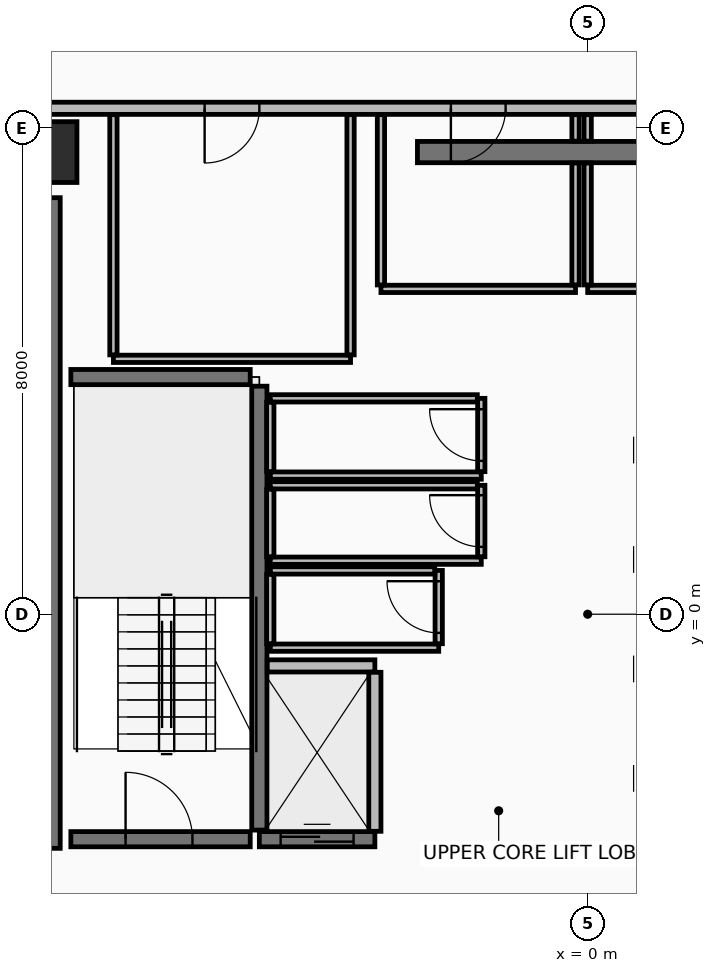
"""IFC4 building model, lengths in metres.
Left out: names, types, materials, properties, quantities, classifications, styles, units other than length and angle.
Written with IfcOpenShell. Run it as: python <this file> out.ifc"""

import sys

from ifc_helpers import new_model, si_unit, direction, frame, frame_2d, origin, origin_2d, place, context, subcontext, project, spatial, rectangle, extrude, element, fill, save


model = new_model("IFC4")
c1 = context("Model", 3, precision=1e-05, world=origin(), true_north=direction((0.0, 1.0)))
c2 = subcontext(c1, "Body", "Model", "MODEL_VIEW")
j1 = project(units=[si_unit("LENGTHUNIT", "METRE"), si_unit("PLANEANGLEUNIT", "RADIAN")], contexts=[c1])
p1 = place(None, origin())
s1 = spatial("IfcSite", under=j1, at=p1, CompositionType="ELEMENT")
p2 = place(p1, origin())
s2 = spatial("IfcBuilding", under=s1, at=p2, CompositionType="ELEMENT")
p3 = place(p2, frame((0.0, 0.0, 287.05)))
s3 = spatial("IfcBuildingStorey", under=s2, at=p3, CompositionType="ELEMENT", Elevation=287.05)
p4 = place(p3, frame((-8.9, 7.6, 0.0), z_axis=(0.0, 0.0, 1.0), x_axis=(1.0, 0.0, 0.0)))
e1 = element("IfcColumn", 1, at=p4, inside=s3, PredefinedType="COLUMN", context=c2, shape_type="SweptSolid", body=[
    extrude(rectangle(XDim=1.0, YDim=1.0, at=origin_2d()), origin(), (0.0, 0.0, 1.0), 3.65),
])
p5 = place(p3, frame((-2.8, 7.6, 0.0), z_axis=(0.0, 0.0, 1.0), x_axis=(1.0, 0.0, 0.0)))
e2 = element("IfcWall", 2, at=p5, inside=s3, PredefinedType="SHEAR", context=c2, shape_type="SweptSolid", body=[
    extrude(rectangle(XDim=5.38, YDim=0.35, at=frame_2d((2.69, 0.0))), origin(), (0.0, 0.0, 1.0), 3.465),
])
p6 = place(p3, frame((-8.9, -3.85, 0.0), z_axis=(0.0, 0.0, 1.0), x_axis=(0.0, 1.0, 0.0)))
e3 = element("IfcWall", 3, at=p6, inside=s3, PredefinedType="SHEAR", context=c2, shape_type="SweptSolid", body=[
    extrude(rectangle(XDim=10.7, YDim=0.45, at=frame_2d((5.35, 0.0))), origin(), (0.0, 0.0, 1.0), 3.465),
])
p7 = place(p3, frame((9.62, 8.32, 0.0), z_axis=(0.0, 0.0, 1.0), x_axis=(-1.0, 0.0, 0.0)))
e4 = element("IfcWall", 4, at=p7, inside=s3, PredefinedType="PARTITIONING", context=c2, shape_type="SweptSolid", body=[
    extrude(rectangle(XDim=19.24, YDim=0.2, at=frame_2d((9.62, 0.0))), origin(), (0.0, 0.0, 1.0), 2.96),
])
p8 = place(p7, frame((10.97, 0.0, 0.0)))
e5 = element("IfcOpeningElement", 5, at=p8, cuts=e4, PredefinedType="OPENING", context=c2, shape_type="SweptSolid", body=[
    extrude(rectangle(XDim=0.9, YDim=2.1, at=frame_2d((0.45, 1.05))), frame((0.0, 0.11, 0.0), z_axis=(0.0, -1.0, 0.0), x_axis=(1.0, 0.0, 0.0)), (0.0, 0.0, 1.0), 0.22),
])
p9 = place(p7, frame((7.57, 0.0, 0.0)))
e6 = element("IfcOpeningElement", 6, at=p9, cuts=e4, PredefinedType="OPENING", context=c2, shape_type="SweptSolid", body=[
    extrude(rectangle(XDim=0.9, YDim=2.1, at=frame_2d((0.45, 1.05))), frame((0.0, 0.11, 0.0), z_axis=(0.0, -1.0, 0.0), x_axis=(1.0, 0.0, 0.0)), (0.0, 0.0, 1.0), 0.22),
])
p10 = place(p7, frame((15.02, 0.0, 0.0)))
e7 = element("IfcOpeningElement", 7, at=p10, cuts=e4, PredefinedType="OPENING", context=c2, shape_type="SweptSolid", body=[
    extrude(rectangle(XDim=0.9, YDim=2.1, at=frame_2d((0.45, 1.05))), frame((0.0, 0.11, 0.0), z_axis=(0.0, -1.0, 0.0), x_axis=(1.0, 0.0, 0.0)), (0.0, 0.0, 1.0), 0.22),
])
p11 = place(p3, frame((-5.4, -3.55, 0.0), z_axis=(0.0, 0.0, 1.0), x_axis=(0.0, 1.0, 0.0)))
e8 = element("IfcWall", 8, at=p11, inside=s3, PredefinedType="SHEAR", context=c2, shape_type="SweptSolid", body=[
    extrude(rectangle(XDim=7.3, YDim=0.25, at=frame_2d((3.65, 0.0))), origin(), (0.0, 0.0, 1.0), 3.465),
])
p12 = place(p3, frame((-8.5, -3.7, 0.0), z_axis=(0.0, 0.0, 1.0), x_axis=(1.0, 0.0, 0.0)))
e9 = element("IfcWall", 9, at=p12, inside=s3, PredefinedType="SHEAR", context=c2, shape_type="SweptSolid", body=[
    extrude(rectangle(XDim=2.95, YDim=0.25, at=frame_2d((1.475, 0.0))), origin(), (0.0, 0.0, 1.0), 3.465),
])
p13 = place(p12, frame((0.9, 0.0, 0.0)))
e10 = element("IfcOpeningElement", 10, at=p13, cuts=e9, PredefinedType="OPENING", context=c2, shape_type="SweptSolid", body=[
    extrude(rectangle(XDim=1.1, YDim=2.15, at=frame_2d((0.55, 1.075))), frame((0.0, 0.135, 0.0), z_axis=(0.0, -1.0, 0.0), x_axis=(1.0, 0.0, 0.0)), (0.0, 0.0, 1.0), 0.27),
])
p14 = place(p3, frame((-8.5, 3.9, 0.0), z_axis=(0.0, 0.0, 1.0), x_axis=(1.0, 0.0, 0.0)))
e11 = element("IfcWall", 11, at=p14, inside=s3, PredefinedType="SHEAR", context=c2, shape_type="SweptSolid", body=[
    extrude(rectangle(XDim=2.95, YDim=0.25, at=frame_2d((1.475, 0.0))), origin(), (0.0, 0.0, 1.0), 3.465),
])
p15 = place(p3, frame((-5.4, -3.7, 0.0), z_axis=(0.0, 0.0, 1.0), x_axis=(1.0, 0.0, 0.0)))
e12 = element("IfcWall", 12, at=p15, inside=s3, PredefinedType="SHEAR", context=c2, shape_type="SweptSolid", body=[
    extrude(rectangle(XDim=1.9, YDim=0.25, at=frame_2d((0.95, 0.0))), origin(), (0.0, 0.0, 1.0), 3.465),
])
p16 = place(p15, frame((0.35, 0.0, 0.0)))
e13 = element("IfcOpeningElement", 13, at=p16, cuts=e12, PredefinedType="OPENING", context=c2, shape_type="SweptSolid", body=[
    extrude(rectangle(XDim=1.2, YDim=2.2, at=frame_2d((0.6, 1.1))), frame((0.0, 0.135, 0.0), z_axis=(0.0, -1.0, 0.0), x_axis=(1.0, 0.0, 0.0)), (0.0, 0.0, 1.0), 0.27),
])
p17 = place(p3, frame((-5.27, -0.85, 0.0), z_axis=(0.0, 0.0, 1.0), x_axis=(1.0, 0.0, 0.0)))
e14 = element("IfcWall", 14, at=p17, inside=s3, PredefinedType="PARTITIONING", context=c2, shape_type="SweptSolid", body=[
    extrude(rectangle(XDim=1.77, YDim=0.2, at=frame_2d((0.885, 0.0))), origin(), (0.0, 0.0, 1.0), 3.465),
])
p18 = place(p3, frame((-3.5, -3.57, 0.0), z_axis=(0.0, 0.0, 1.0), x_axis=(0.0, 1.0, 0.0)))
e15 = element("IfcWall", 15, at=p18, inside=s3, PredefinedType="PARTITIONING", context=c2, shape_type="SweptSolid", body=[
    extrude(rectangle(XDim=2.615, YDim=0.2, at=frame_2d((1.308, 0.0))), origin(), (0.0, 0.0, 1.0), 3.465),
])
p19 = place(p3, frame((-5.22, 2.28, 0.0), z_axis=(0.0, 0.0, 1.0), x_axis=(1.0, 0.0, 0.0)))
e16 = element("IfcWall", 16, at=p19, inside=s3, PredefinedType="PARTITIONING", context=c2, shape_type="SweptSolid", body=[
    extrude(rectangle(XDim=3.47, YDim=0.12, at=frame_2d((1.735, 0.0))), origin(), (0.0, 0.0, 1.0), 3.465),
])
p20 = place(p3, frame((-1.75, 2.345, 0.0), z_axis=(0.0, 0.0, 1.0), x_axis=(0.0, 1.0, 0.0)))
e17 = element("IfcWall", 17, at=p20, inside=s3, PredefinedType="PARTITIONING", context=c2, shape_type="SweptSolid", body=[
    extrude(rectangle(XDim=1.205, YDim=0.12, at=frame_2d((0.603, 0.0))), origin(), (0.0, 0.0, 1.0), 3.465),
])
p21 = place(p20, frame((0.177, 0.0, 0.0)))
e18 = element("IfcOpeningElement", 18, at=p21, cuts=e17, PredefinedType="OPENING", context=c2, shape_type="SweptSolid", body=[
    extrude(rectangle(XDim=0.85, YDim=2.1, at=frame_2d((0.425, 1.05))), frame((0.0, 0.07, 0.0), z_axis=(0.0, -1.0, 0.0), x_axis=(1.0, 0.0, 0.0)), (0.0, 0.0, 1.0), 0.14),
])
p22 = place(p3, frame((-1.815, 3.55, 0.0), z_axis=(0.0, 0.0, 1.0), x_axis=(-1.0, 0.0, 0.0)))
e19 = element("IfcWall", 19, at=p22, inside=s3, PredefinedType="PARTITIONING", context=c2, shape_type="SweptSolid", body=[
    extrude(rectangle(XDim=3.405, YDim=0.12, at=frame_2d((1.703, 0.0))), origin(), (0.0, 0.0, 1.0), 3.465),
])
p23 = place(p3, frame((-5.22, 3.485, 0.0), z_axis=(0.0, 0.0, 1.0), x_axis=(0.0, -1.0, 0.0)))
e20 = element("IfcWall", 20, at=p23, inside=s3, PredefinedType="PARTITIONING", context=c2, shape_type="SweptSolid", body=[
    extrude(rectangle(XDim=1.14, YDim=0.12, at=frame_2d((0.57, 0.0))), origin(), (0.0, 0.0, 1.0), 3.465),
])
p24 = place(p3, frame((-5.22, 0.88, 0.0), z_axis=(0.0, 0.0, 1.0), x_axis=(1.0, 0.0, 0.0)))
e21 = element("IfcWall", 21, at=p24, inside=s3, PredefinedType="PARTITIONING", context=c2, shape_type="SweptSolid", body=[
    extrude(rectangle(XDim=3.47, YDim=0.12, at=frame_2d((1.735, 0.0))), origin(), (0.0, 0.0, 1.0), 3.465),
])
p25 = place(p3, frame((-1.75, 0.945, 0.0), z_axis=(0.0, 0.0, 1.0), x_axis=(0.0, 1.0, 0.0)))
e22 = element("IfcWall", 22, at=p25, inside=s3, PredefinedType="PARTITIONING", context=c2, shape_type="SweptSolid", body=[
    extrude(rectangle(XDim=1.175, YDim=0.12, at=frame_2d((0.587, 0.0))), origin(), (0.0, 0.0, 1.0), 3.465),
])
p26 = place(p25, frame((0.163, 0.0, 0.0)))
e23 = element("IfcOpeningElement", 23, at=p26, cuts=e22, PredefinedType="OPENING", context=c2, shape_type="SweptSolid", body=[
    extrude(rectangle(XDim=0.85, YDim=2.1, at=frame_2d((0.425, 1.05))), frame((0.0, 0.07, 0.0), z_axis=(0.0, -1.0, 0.0), x_axis=(1.0, 0.0, 0.0)), (0.0, 0.0, 1.0), 0.14),
])
p27 = place(p3, frame((-1.815, 2.12, 0.0), z_axis=(0.0, 0.0, 1.0), x_axis=(-1.0, 0.0, 0.0)))
e24 = element("IfcWall", 24, at=p27, inside=s3, PredefinedType="PARTITIONING", context=c2, shape_type="SweptSolid", body=[
    extrude(rectangle(XDim=3.405, YDim=0.12, at=frame_2d((1.703, 0.0))), origin(), (0.0, 0.0, 1.0), 3.465),
])
p28 = place(p3, frame((-5.22, 2.055, 0.0), z_axis=(0.0, 0.0, 1.0), x_axis=(0.0, -1.0, 0.0)))
e25 = element("IfcWall", 25, at=p28, inside=s3, PredefinedType="PARTITIONING", context=c2, shape_type="SweptSolid", body=[
    extrude(rectangle(XDim=1.11, YDim=0.12, at=frame_2d((0.555, 0.0))), origin(), (0.0, 0.0, 1.0), 3.465),
])
p29 = place(p3, frame((-5.22, -0.55, 0.0), z_axis=(0.0, 0.0, 1.0), x_axis=(1.0, 0.0, 0.0)))
e26 = element("IfcWall", 26, at=p29, inside=s3, PredefinedType="PARTITIONING", context=c2, shape_type="SweptSolid", body=[
    extrude(rectangle(XDim=2.77, YDim=0.12, at=frame_2d((1.385, 0.0))), origin(), (0.0, 0.0, 1.0), 3.465),
])
p30 = place(p3, frame((-2.45, -0.485, 0.0), z_axis=(0.0, 0.0, 1.0), x_axis=(0.0, 1.0, 0.0)))
e27 = element("IfcWall", 27, at=p30, inside=s3, PredefinedType="PARTITIONING", context=c2, shape_type="SweptSolid", body=[
    extrude(rectangle(XDim=1.205, YDim=0.12, at=frame_2d((0.603, 0.0))), origin(), (0.0, 0.0, 1.0), 3.465),
])
p31 = place(p30, frame((0.178, 0.0, 0.0)))
e28 = element("IfcOpeningElement", 28, at=p31, cuts=e27, PredefinedType="OPENING", context=c2, shape_type="SweptSolid", body=[
    extrude(rectangle(XDim=0.85, YDim=2.1, at=frame_2d((0.425, 1.05))), frame((0.0, 0.07, 0.0), z_axis=(0.0, -1.0, 0.0), x_axis=(1.0, 0.0, 0.0)), (0.0, 0.0, 1.0), 0.14),
])
p32 = place(p3, frame((-2.515, 0.72, 0.0), z_axis=(0.0, 0.0, 1.0), x_axis=(-1.0, 0.0, 0.0)))
e29 = element("IfcWall", 29, at=p32, inside=s3, PredefinedType="PARTITIONING", context=c2, shape_type="SweptSolid", body=[
    extrude(rectangle(XDim=2.705, YDim=0.12, at=frame_2d((1.353, 0.0))), origin(), (0.0, 0.0, 1.0), 3.465),
])
p33 = place(p3, frame((-5.22, 0.655, 0.0), z_axis=(0.0, 0.0, 1.0), x_axis=(0.0, -1.0, 0.0)))
e30 = element("IfcWall", 30, at=p33, inside=s3, PredefinedType="PARTITIONING", context=c2, shape_type="SweptSolid", body=[
    extrude(rectangle(XDim=1.14, YDim=0.12, at=frame_2d((0.57, 0.0))), origin(), (0.0, 0.0, 1.0), 3.465),
])
p34 = place(p3, frame((-3.4, 5.35, 0.0), z_axis=(0.0, 0.0, 1.0), x_axis=(1.0, 0.0, 0.0)))
e31 = element("IfcWall", 31, at=p34, inside=s3, PredefinedType="PARTITIONING", context=c2, shape_type="SweptSolid", body=[
    extrude(rectangle(XDim=3.2, YDim=0.12, at=frame_2d((1.6, 0.0))), origin(), (0.0, 0.0, 1.0), 3.465),
])
p35 = place(p3, frame((-0.2, 5.415, 0.0), z_axis=(0.0, 0.0, 1.0), x_axis=(0.0, 1.0, 0.0)))
e32 = element("IfcWall", 32, at=p35, inside=s3, PredefinedType="PARTITIONING", context=c2, shape_type="SweptSolid", body=[
    extrude(rectangle(XDim=2.005, YDim=0.12, at=frame_2d((1.002, 0.0))), origin(), (0.0, 0.0, 1.0), 2.76),
])
p36 = place(p3, frame((-0.2, 7.78, 0.0), z_axis=(0.0, 0.0, 1.0), x_axis=(0.0, 1.0, 0.0)))
e33 = element("IfcWall", 33, at=p36, inside=s3, PredefinedType="PARTITIONING", context=c2, shape_type="SweptSolid", body=[
    extrude(rectangle(XDim=0.435, YDim=0.12, at=frame_2d((0.218, 0.0))), origin(), (0.0, 0.0, 1.0), 2.76),
])
p37 = place(p3, frame((-3.4, 8.215, 0.0), z_axis=(0.0, 0.0, 1.0), x_axis=(0.0, -1.0, 0.0)))
e34 = element("IfcWall", 34, at=p37, inside=s3, PredefinedType="PARTITIONING", context=c2, shape_type="SweptSolid", body=[
    extrude(rectangle(XDim=2.8, YDim=0.12, at=frame_2d((1.4, 0.0))), origin(), (0.0, 0.0, 1.0), 2.76),
])
p38 = place(p3, frame((0.0, 5.35, 0.0), z_axis=(0.0, 0.0, 1.0), x_axis=(1.0, 0.0, 0.0)))
e35 = element("IfcWall", 35, at=p38, inside=s3, PredefinedType="PARTITIONING", context=c2, shape_type="SweptSolid", body=[
    extrude(rectangle(XDim=3.2, YDim=0.12, at=frame_2d((1.6, 0.0))), origin(), (0.0, 0.0, 1.0), 2.76),
])
p39 = place(p3, frame((0.0, 8.215, 0.0), z_axis=(0.0, 0.0, 1.0), x_axis=(0.0, -1.0, 0.0)))
e36 = element("IfcWall", 36, at=p39, inside=s3, PredefinedType="PARTITIONING", context=c2, shape_type="SweptSolid", body=[
    extrude(rectangle(XDim=0.435, YDim=0.12, at=frame_2d((0.218, 0.0))), origin(), (0.0, 0.0, 1.0), 2.76),
])
p40 = place(p3, frame((0.0, 7.42, 0.0), z_axis=(0.0, 0.0, 1.0), x_axis=(0.0, -1.0, 0.0)))
e37 = element("IfcWall", 37, at=p40, inside=s3, PredefinedType="PARTITIONING", context=c2, shape_type="SweptSolid", body=[
    extrude(rectangle(XDim=2.005, YDim=0.12, at=frame_2d((1.002, 0.0))), origin(), (0.0, 0.0, 1.0), 2.76),
])
p41 = place(p3, frame((-7.8, 4.2, 0.0), z_axis=(0.0, 0.0, 1.0), x_axis=(1.0, 0.0, 0.0)))
e38 = element("IfcWall", 38, at=p41, inside=s3, PredefinedType="PARTITIONING", context=c2, shape_type="SweptSolid", body=[
    extrude(rectangle(XDim=3.9, YDim=0.12, at=frame_2d((1.95, 0.0))), origin(), (0.0, 0.0, 1.0), 3.465),
])
for number, where, z_axis, x_axis in (
    (39, (-3.9, 4.265, 0.0), (0.0, 0.0, 1.0), (0.0, 1.0, 0.0)),
    (40, (-7.8, 8.215, 0.0), (0.0, 0.0, 1.0), (0.0, -1.0, 0.0)),
):
    element("IfcWall", number, at=place(p3, frame(where, z_axis=z_axis, x_axis=x_axis)), inside=s3, PredefinedType="PARTITIONING", context=c2, shape_type="SweptSolid", body=[
        extrude(rectangle(XDim=3.95, YDim=0.12, at=frame_2d((1.975, 0.0))), origin(), (0.0, 0.0, 1.0), 2.76),
    ])
p42 = place(p13, origin())
e41 = element("IfcDoor", 41, at=p42, inside=s3, OperationType="SINGLE_SWING_LEFT", PredefinedType="DOOR", context=c2, shape_type="SweptSolid", body=[
    extrude(rectangle(XDim=1.1, YDim=2.15, at=frame_2d((0.55, 1.075))), frame((0.0, 0.025, 0.0), z_axis=(0.0, -1.0, 0.0), x_axis=(1.0, 0.0, 0.0)), (0.0, 0.0, 1.0), 0.05),
])
fill(e10, e41)
p43 = place(p16, origin())
e42 = element("IfcDoor", 42, at=p43, inside=s3, OperationType="SLIDING_TO_RIGHT", PredefinedType="DOOR", context=c2, shape_type="SweptSolid", body=[
    extrude(rectangle(XDim=1.2, YDim=2.2, at=frame_2d((0.6, 1.1))), frame((0.0, 0.025, 0.0), z_axis=(0.0, -1.0, 0.0), x_axis=(1.0, 0.0, 0.0)), (0.0, 0.0, 1.0), 0.05),
])
fill(e13, e42)
p44 = place(p21, frame((0.85, 0.0, 0.0), z_axis=(0.0, 0.0, 1.0), x_axis=(-1.0, 0.0, 0.0)))
e43 = element("IfcDoor", 43, at=p44, inside=s3, OperationType="SINGLE_SWING_RIGHT", PredefinedType="DOOR", context=c2, shape_type="SweptSolid", body=[
    extrude(rectangle(XDim=0.85, YDim=2.1, at=frame_2d((0.425, 1.05))), frame((0.0, 0.025, 0.0), z_axis=(0.0, -1.0, 0.0), x_axis=(1.0, 0.0, 0.0)), (0.0, 0.0, 1.0), 0.05),
])
fill(e18, e43)
p45 = place(p26, frame((0.85, 0.0, 0.0), z_axis=(0.0, 0.0, 1.0), x_axis=(-1.0, 0.0, 0.0)))
e44 = element("IfcDoor", 44, at=p45, inside=s3, OperationType="SINGLE_SWING_RIGHT", PredefinedType="DOOR", context=c2, shape_type="SweptSolid", body=[
    extrude(rectangle(XDim=0.85, YDim=2.1, at=frame_2d((0.425, 1.05))), frame((0.0, 0.025, 0.0), z_axis=(0.0, -1.0, 0.0), x_axis=(1.0, 0.0, 0.0)), (0.0, 0.0, 1.0), 0.05),
])
fill(e23, e44)
p46 = place(p31, frame((0.85, 0.0, 0.0), z_axis=(0.0, 0.0, 1.0), x_axis=(-1.0, 0.0, 0.0)))
e45 = element("IfcDoor", 45, at=p46, inside=s3, OperationType="SINGLE_SWING_RIGHT", PredefinedType="DOOR", context=c2, shape_type="SweptSolid", body=[
    extrude(rectangle(XDim=0.85, YDim=2.1, at=frame_2d((0.425, 1.05))), frame((0.0, 0.025, 0.0), z_axis=(0.0, -1.0, 0.0), x_axis=(1.0, 0.0, 0.0)), (0.0, 0.0, 1.0), 0.05),
])
fill(e28, e45)
p47 = place(p8, frame((0.9, 0.0, 0.0), z_axis=(0.0, 0.0, 1.0), x_axis=(-1.0, 0.0, 0.0)))
e46 = element("IfcDoor", 46, at=p47, inside=s3, OperationType="SINGLE_SWING_LEFT", PredefinedType="DOOR", context=c2, shape_type="SweptSolid", body=[
    extrude(rectangle(XDim=0.9, YDim=2.1, at=frame_2d((0.45, 1.05))), frame((0.0, 0.025, 0.0), z_axis=(0.0, -1.0, 0.0), x_axis=(1.0, 0.0, 0.0)), (0.0, 0.0, 1.0), 0.05),
])
fill(e5, e46)
p48 = place(p10, frame((0.9, 0.0, 0.0), z_axis=(0.0, 0.0, 1.0), x_axis=(-1.0, 0.0, 0.0)))
e47 = element("IfcDoor", 47, at=p48, inside=s3, OperationType="SINGLE_SWING_LEFT", PredefinedType="DOOR", context=c2, shape_type="SweptSolid", body=[
    extrude(rectangle(XDim=0.9, YDim=2.1, at=frame_2d((0.45, 1.05))), frame((0.0, 0.025, 0.0), z_axis=(0.0, -1.0, 0.0), x_axis=(1.0, 0.0, 0.0)), (0.0, 0.0, 1.0), 0.05),
])
fill(e7, e47)
save(model, sys.argv[1])
